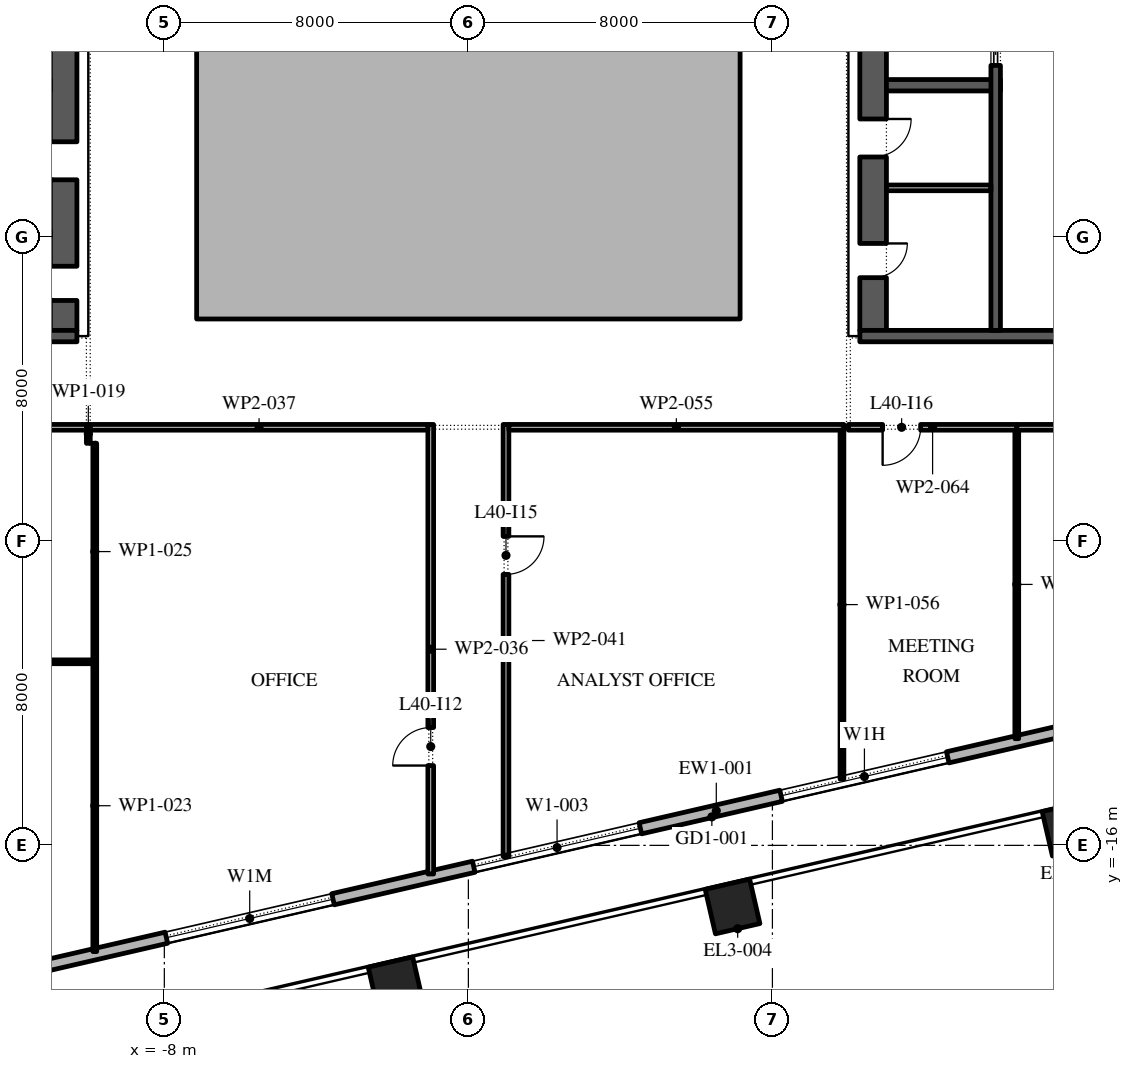
"""IFC4 building model, lengths in metres.
Left out: names, types, materials, properties, quantities, classifications, styles, units other than length and angle.
Written with IfcOpenShell. Run it as: python <this file> out.ifc"""

import sys

from ifc_helpers import new_model, si_unit, direction, frame, frame_2d, origin, origin_2d, place, context, subcontext, project, spatial, polyline, rectangle, outline, extrude, element, fill, save


model = new_model("IFC4")
c1 = context("Model", 3, precision=1e-05, world=origin(), true_north=direction((0.0, 1.0)))
c2 = subcontext(c1, "Body", "Model", "MODEL_VIEW")
j1 = project(units=[si_unit("LENGTHUNIT", "METRE"), si_unit("PLANEANGLEUNIT", "RADIAN")], contexts=[c1])
p1 = place(None, origin())
s1 = spatial("IfcSite", under=j1, at=p1, CompositionType="ELEMENT")
p2 = place(p1, origin())
s2 = spatial("IfcBuilding", under=s1, at=p2, CompositionType="ELEMENT")
p3 = place(p2, frame((0.0, 0.0, 184.2)))
s3 = spatial("IfcBuildingStorey", under=s2, at=p3, CompositionType="ELEMENT", Elevation=184.2)
for number, where, z_axis, x_axis in (
    (1, (-1.916, -19.655, 0.0), (0.0, 0.0, 1.0), (0.974, 0.225, 0.0)),
    (2, (6.951, -17.608, 0.0), (0.0, 0.0, 1.0), (0.974, 0.225, 0.0)),
    (3, (15.818, -15.561, 0.0), (0.0, 0.0, 1.0), (0.974, 0.225, 0.0)),
):
    element("IfcColumn", number, at=place(p3, frame(where, z_axis=z_axis, x_axis=x_axis)), inside=s3, PredefinedType="COLUMN", context=c2, shape_type="SweptSolid", body=[
        extrude(rectangle(XDim=1.2, YDim=1.2, at=origin_2d()), origin(), (0.0, 0.0, 1.0), 4.2),
    ])
p4 = place(p3, origin())
e4 = element("IfcWall", 4, at=p4, inside=s3, PredefinedType="STANDARD", context=c2, shape_type="SweptSolid", body=[
    extrude(outline(polyline([(-7.15, -2.15), (7.15, -2.15), (7.15, 16.15), (-7.15, 16.15), (-7.15, -2.15)]), holes=[polyline([(-7.0, -2.0), (-7.0, 16.0), (7.0, 16.0), (7.0, -2.0), (-7.0, -2.0)])]), origin(), (0.0, 0.0, 1.0), 4.0),
])
p5 = place(p3, frame((-17.592, -20.657, 0.0), z_axis=(0.0, 0.0, 1.0), x_axis=(0.974370243697, 0.224950279389, 0.0)))
e5 = element("IfcWall", 5, at=p5, inside=s3, PredefinedType="STANDARD", context=c2, shape_type="SweptSolid", body=[
    extrude(rectangle(XDim=49.5, YDim=0.3, at=frame_2d((24.75, 0.0))), origin(), (0.0, 0.0, 1.0), 4.0),
])
p6 = place(p5, frame((2.8, 0.0, 0.0)))
e6 = element("IfcOpeningElement", 6, at=p6, cuts=e5, PredefinedType="OPENING", context=c2, shape_type="SweptSolid", body=[
    extrude(rectangle(XDim=2.4, YDim=3.5, at=frame_2d((1.2, 1.75))), frame((0.0, 0.16, 0.0), z_axis=(0.0, -1.0, 0.0), x_axis=(1.0, 0.0, 0.0)), (0.0, 0.0, 1.0), 0.32),
])
p7 = place(p5, frame((9.9, 0.0, 0.45)))
e7 = element("IfcOpeningElement", 7, at=p7, cuts=e5, PredefinedType="OPENING", context=c2, shape_type="SweptSolid", body=[
    extrude(rectangle(XDim=4.5, YDim=2.575, at=frame_2d((2.25, 1.288))), frame((0.0, 0.16, 0.0), z_axis=(0.0, -1.0, 0.0), x_axis=(1.0, 0.0, 0.0)), (0.0, 0.0, 1.0), 0.32),
])
p8 = place(p5, frame((18.2, 0.0, 0.45)))
e8 = element("IfcOpeningElement", 8, at=p8, cuts=e5, PredefinedType="OPENING", context=c2, shape_type="SweptSolid", body=[
    extrude(rectangle(XDim=4.5, YDim=3.05, at=frame_2d((2.25, 1.525))), frame((0.0, 0.16, 0.0), z_axis=(0.0, -1.0, 0.0), x_axis=(1.0, 0.0, 0.0)), (0.0, 0.0, 1.0), 0.32),
])
p9 = place(p5, frame((26.5, 0.0, 0.45)))
e9 = element("IfcOpeningElement", 9, at=p9, cuts=e5, PredefinedType="OPENING", context=c2, shape_type="SweptSolid", body=[
    extrude(rectangle(XDim=4.5, YDim=2.75, at=frame_2d((2.25, 1.375))), frame((0.0, 0.16, 0.0), z_axis=(0.0, -1.0, 0.0), x_axis=(1.0, 0.0, 0.0)), (0.0, 0.0, 1.0), 0.32),
])
p10 = place(p5, frame((35.85, 0.0, 0.0)))
e10 = element("IfcOpeningElement", 10, at=p10, cuts=e5, PredefinedType="OPENING", context=c2, shape_type="SweptSolid", body=[
    extrude(rectangle(XDim=2.4, YDim=3.5, at=frame_2d((1.2, 1.75))), frame((0.0, 0.16, 0.0), z_axis=(0.0, -1.0, 0.0), x_axis=(1.0, 0.0, 0.0)), (0.0, 0.0, 1.0), 0.32),
])
p11 = place(p5, frame((43.1, 0.0, 0.45)))
e11 = element("IfcOpeningElement", 11, at=p11, cuts=e5, PredefinedType="OPENING", context=c2, shape_type="SweptSolid", body=[
    extrude(rectangle(XDim=4.5, YDim=2.875, at=frame_2d((2.25, 1.438))), frame((0.0, 0.16, 0.0), z_axis=(0.0, -1.0, 0.0), x_axis=(1.0, 0.0, 0.0)), (0.0, 0.0, 1.0), 0.32),
])
p12 = place(p3, frame((-10.65, -2.45, 0.0), z_axis=(0.0, 0.0, 1.0), x_axis=(0.0, 1.0, 0.0)))
e12 = element("IfcWall", 12, at=p12, inside=s3, PredefinedType="SHEAR", context=c2, shape_type="SweptSolid", body=[
    extrude(rectangle(XDim=27.9, YDim=0.7, at=frame_2d((13.95, 0.0))), origin(), (0.0, 0.0, 1.0), 4.0),
])
p13 = place(p12, frame((23.65, 0.0, 0.0)))
e13 = element("IfcOpeningElement", 13, at=p13, cuts=e12, PredefinedType="OPENING", context=c2, shape_type="SweptSolid", body=[
    extrude(rectangle(XDim=2.4, YDim=2.1, at=frame_2d((1.2, 1.05))), frame((0.0, 0.36, 0.0), z_axis=(0.0, -1.0, 0.0), x_axis=(1.0, 0.0, 0.0)), (0.0, 0.0, 1.0), 0.72),
])
p14 = place(p12, frame((0.788, 0.0, 0.0)))
e14 = element("IfcOpeningElement", 14, at=p14, cuts=e12, PredefinedType="OPENING", context=c2, shape_type="SweptSolid", body=[
    extrude(rectangle(XDim=0.9, YDim=2.1, at=frame_2d((0.45, 1.05))), frame((0.0, 0.36, 0.0), z_axis=(0.0, -1.0, 0.0), x_axis=(1.0, 0.0, 0.0)), (0.0, 0.0, 1.0), 0.72),
])
p15 = place(p12, frame((3.962, 0.0, 0.0)))
e15 = element("IfcOpeningElement", 15, at=p15, cuts=e12, PredefinedType="OPENING", context=c2, shape_type="SweptSolid", body=[
    extrude(rectangle(XDim=1.0, YDim=2.1, at=frame_2d((0.5, 1.05))), frame((0.0, 0.36, 0.0), z_axis=(0.0, -1.0, 0.0), x_axis=(1.0, 0.0, 0.0)), (0.0, 0.0, 1.0), 0.72),
])
p16 = place(p3, frame((-21.7, -2.6, 0.0), z_axis=(0.0, 0.0, 1.0), x_axis=(1.0, 0.0, 0.0)))
e16 = element("IfcWall", 16, at=p16, inside=s3, PredefinedType="SHEAR", context=c2, shape_type="SweptSolid", body=[
    extrude(rectangle(XDim=11.4, YDim=0.3, at=frame_2d((5.7, 0.0))), origin(), (0.0, 0.0, 1.0), 4.0),
])
p17 = place(p3, frame((10.65, -2.45, 0.0), z_axis=(0.0, 0.0, 1.0), x_axis=(0.0, 1.0, 0.0)))
e17 = element("IfcWall", 17, at=p17, inside=s3, PredefinedType="SHEAR", context=c2, shape_type="SweptSolid", body=[
    extrude(rectangle(XDim=27.9, YDim=0.7, at=frame_2d((13.95, 0.0))), origin(), (0.0, 0.0, 1.0), 4.0),
])
p18 = place(p17, frame((23.65, 0.0, 0.0)))
e18 = element("IfcOpeningElement", 18, at=p18, cuts=e17, PredefinedType="OPENING", context=c2, shape_type="SweptSolid", body=[
    extrude(rectangle(XDim=2.4, YDim=2.1, at=frame_2d((1.2, 1.05))), frame((0.0, 0.36, 0.0), z_axis=(0.0, -1.0, 0.0), x_axis=(1.0, 0.0, 0.0)), (0.0, 0.0, 1.0), 0.72),
])
p19 = place(p17, frame((1.387, 0.0, 0.0)))
e19 = element("IfcOpeningElement", 19, at=p19, cuts=e17, PredefinedType="OPENING", context=c2, shape_type="SweptSolid", body=[
    extrude(rectangle(XDim=0.9, YDim=2.1, at=frame_2d((0.45, 1.05))), frame((0.0, 0.36, 0.0), z_axis=(0.0, -1.0, 0.0), x_axis=(1.0, 0.0, 0.0)), (0.0, 0.0, 1.0), 0.72),
])
p20 = place(p17, frame((4.562, 0.0, 0.0)))
e20 = element("IfcOpeningElement", 20, at=p20, cuts=e17, PredefinedType="OPENING", context=c2, shape_type="SweptSolid", body=[
    extrude(rectangle(XDim=1.0, YDim=2.1, at=frame_2d((0.5, 1.05))), frame((0.0, 0.36, 0.0), z_axis=(0.0, -1.0, 0.0), x_axis=(1.0, 0.0, 0.0)), (0.0, 0.0, 1.0), 0.72),
])
p21 = place(p3, frame((10.3, -2.6, 0.0), z_axis=(0.0, 0.0, 1.0), x_axis=(1.0, 0.0, 0.0)))
e21 = element("IfcWall", 21, at=p21, inside=s3, PredefinedType="SHEAR", context=c2, shape_type="SweptSolid", body=[
    extrude(rectangle(XDim=11.4, YDim=0.3, at=frame_2d((5.7, 0.0))), origin(), (0.0, 0.0, 1.0), 4.0),
])
p22 = place(p3, frame((11.0, 4.0, 0.0), z_axis=(0.0, 0.0, 1.0), x_axis=(1.0, 0.0, 0.0)))
e22 = element("IfcWall", 22, at=p22, inside=s3, PredefinedType="SHEAR", context=c2, shape_type="SweptSolid", body=[
    extrude(rectangle(XDim=3.0, YDim=0.3, at=frame_2d((1.5, 0.0))), origin(), (0.0, 0.0, 1.0), 4.0),
])
p23 = place(p3, frame((13.875, -2.45, 0.0), z_axis=(0.0, 0.0, 1.0), x_axis=(0.0, 1.0, 0.0)))
e23 = element("IfcWall", 23, at=p23, inside=s3, PredefinedType="SHEAR", context=c2, shape_type="SweptSolid", body=[
    extrude(rectangle(XDim=21.3, YDim=0.25, at=frame_2d((10.65, 0.0))), origin(), (0.0, 0.0, 1.0), 4.0),
])
p24 = place(p23, frame((17.786, 0.0, 0.0)))
e24 = element("IfcOpeningElement", 24, at=p24, cuts=e23, PredefinedType="OPENING", context=c2, shape_type="SweptSolid", body=[
    extrude(rectangle(XDim=0.9, YDim=2.1, at=frame_2d((0.45, 1.05))), frame((0.0, 0.135, 0.0), z_axis=(0.0, -1.0, 0.0), x_axis=(1.0, 0.0, 0.0)), (0.0, 0.0, 1.0), 0.27),
])
p25 = place(p23, frame((6.971, 0.0, 0.0)))
e25 = element("IfcOpeningElement", 25, at=p25, cuts=e23, PredefinedType="OPENING", context=c2, shape_type="SweptSolid", body=[
    extrude(rectangle(XDim=1.1, YDim=2.1, at=frame_2d((0.55, 1.05))), frame((0.0, 0.135, 0.0), z_axis=(0.0, -1.0, 0.0), x_axis=(1.0, 0.0, 0.0)), (0.0, 0.0, 1.0), 0.27),
])
p26 = place(p23, frame((9.114, 0.0, 0.0)))
e26 = element("IfcOpeningElement", 26, at=p26, cuts=e23, PredefinedType="OPENING", context=c2, shape_type="SweptSolid", body=[
    extrude(rectangle(XDim=1.1, YDim=2.1, at=frame_2d((0.55, 1.05))), frame((0.0, 0.135, 0.0), z_axis=(0.0, -1.0, 0.0), x_axis=(1.0, 0.0, 0.0)), (0.0, 0.0, 1.0), 0.27),
])
p27 = place(p23, frame((11.257, 0.0, 0.0)))
e27 = element("IfcOpeningElement", 27, at=p27, cuts=e23, PredefinedType="OPENING", context=c2, shape_type="SweptSolid", body=[
    extrude(rectangle(XDim=1.1, YDim=2.1, at=frame_2d((0.55, 1.05))), frame((0.0, 0.135, 0.0), z_axis=(0.0, -1.0, 0.0), x_axis=(1.0, 0.0, 0.0)), (0.0, 0.0, 1.0), 0.27),
])
p28 = place(p23, frame((13.4, 0.0, 0.0)))
e28 = element("IfcOpeningElement", 28, at=p28, cuts=e23, PredefinedType="OPENING", context=c2, shape_type="SweptSolid", body=[
    extrude(rectangle(XDim=1.1, YDim=2.1, at=frame_2d((0.55, 1.05))), frame((0.0, 0.135, 0.0), z_axis=(0.0, -1.0, 0.0), x_axis=(1.0, 0.0, 0.0)), (0.0, 0.0, 1.0), 0.27),
])
p29 = place(p3, frame((11.0, 1.3, 0.0), z_axis=(0.0, 0.0, 1.0), x_axis=(1.0, 0.0, 0.0)))
e29 = element("IfcWall", 29, at=p29, inside=s3, PredefinedType="PARTITIONING", context=c2, shape_type="SweptSolid", body=[
    extrude(rectangle(XDim=2.75, YDim=0.15, at=frame_2d((1.375, 0.0))), origin(), (0.0, 0.0, 1.0), 4.0),
])
p30 = place(p3, frame((-10.0, -5.42, 0.0), z_axis=(0.0, 0.0, 1.0), x_axis=(0.0, 1.0, 0.0)))
e30 = element("IfcWall", 30, at=p30, inside=s3, PredefinedType="PARTITIONING", context=c2, shape_type="SweptSolid", body=[
    extrude(rectangle(XDim=0.495, YDim=0.1, at=frame_2d((0.248, 0.0))), origin(), (0.0, 0.0, 1.0), 4.0),
])
p31 = place(p3, frame((-10.05, -5.0, 0.0), z_axis=(0.0, 0.0, 1.0), x_axis=(-1.0, 0.0, 0.0)))
e31 = element("IfcWall", 31, at=p31, inside=s3, PredefinedType="PARTITIONING", context=c2, shape_type="SweptSolid", body=[
    extrude(rectangle(XDim=13.665, YDim=0.15, at=frame_2d((6.833, 0.0))), origin(), (0.0, 0.0, 1.0), 4.0),
])
p32 = place(p31, frame((5.09, 0.0, 0.0)))
e32 = element("IfcOpeningElement", 32, at=p32, cuts=e31, PredefinedType="OPENING", context=c2, shape_type="SweptSolid", body=[
    extrude(rectangle(XDim=1.0, YDim=2.1, at=frame_2d((0.5, 1.05))), frame((0.0, 0.085, 0.0), z_axis=(0.0, -1.0, 0.0), x_axis=(1.0, 0.0, 0.0)), (0.0, 0.0, 1.0), 0.17),
])
p33 = place(p3, frame((-9.83, -18.794, 0.0), z_axis=(0.0, 0.0, 1.0), x_axis=(0.0, 1.0, 0.0)))
e33 = element("IfcWall", 33, at=p33, inside=s3, PredefinedType="PARTITIONING", context=c2, shape_type="SweptSolid", body=[
    extrude(rectangle(XDim=7.674, YDim=0.1, at=frame_2d((3.837, 0.0))), origin(), (0.0, 0.0, 1.0), 4.0),
])
p34 = place(p3, frame((-9.88, -11.17, 0.0), z_axis=(0.0, 0.0, 1.0), x_axis=(-1.0, 0.0, 0.0)))
e34 = element("IfcWall", 34, at=p34, inside=s3, PredefinedType="PARTITIONING", context=c2, shape_type="SweptSolid", body=[
    extrude(rectangle(XDim=13.68, YDim=0.1, at=frame_2d((6.84, 0.0))), origin(), (0.0, 0.0, 1.0), 4.0),
])
p35 = place(p34, frame((3.81, 0.0, 0.0)))
e35 = element("IfcOpeningElement", 35, at=p35, cuts=e34, PredefinedType="OPENING", context=c2, shape_type="SweptSolid", body=[
    extrude(rectangle(XDim=0.9, YDim=2.1, at=frame_2d((0.45, 1.05))), frame((0.0, 0.06, 0.0), z_axis=(0.0, -1.0, 0.0), x_axis=(1.0, 0.0, 0.0)), (0.0, 0.0, 1.0), 0.12),
])
p36 = place(p3, frame((-9.83, -11.12, 0.0), z_axis=(0.0, 0.0, 1.0), x_axis=(0.0, 1.0, 0.0)))
e36 = element("IfcWall", 36, at=p36, inside=s3, PredefinedType="PARTITIONING", context=c2, shape_type="SweptSolid", body=[
    extrude(rectangle(XDim=5.7, YDim=0.1, at=frame_2d((2.85, 0.0))), origin(), (0.0, 0.0, 1.0), 4.0),
])
p37 = place(p3, frame((-0.99, -16.753, 0.0), z_axis=(0.0, 0.0, 1.0), x_axis=(0.0, 1.0, 0.0)))
e37 = element("IfcWall", 37, at=p37, inside=s3, PredefinedType="PARTITIONING", context=c2, shape_type="SweptSolid", body=[
    extrude(rectangle(XDim=11.828, YDim=0.15, at=frame_2d((5.914, 0.0))), origin(), (0.0, 0.0, 1.0), 4.0),
])
p38 = place(p37, frame((2.853, 0.0, 0.0)))
e38 = element("IfcOpeningElement", 38, at=p38, cuts=e37, PredefinedType="OPENING", context=c2, shape_type="SweptSolid", body=[
    extrude(rectangle(XDim=1.0, YDim=2.1, at=frame_2d((0.5, 1.05))), frame((0.0, 0.085, 0.0), z_axis=(0.0, -1.0, 0.0), x_axis=(1.0, 0.0, 0.0)), (0.0, 0.0, 1.0), 0.17),
])
p39 = place(p3, frame((-1.065, -5.0, 0.0), z_axis=(0.0, 0.0, 1.0), x_axis=(-1.0, 0.0, 0.0)))
e39 = element("IfcWall", 39, at=p39, inside=s3, PredefinedType="PARTITIONING", context=c2, shape_type="SweptSolid", body=[
    extrude(rectangle(XDim=8.885, YDim=0.15, at=frame_2d((4.442, 0.0))), origin(), (0.0, 0.0, 1.0), 4.0),
])
p40 = place(p3, frame((0.99, -4.925, 0.0), z_axis=(0.0, 0.0, 1.0), x_axis=(0.0, -1.0, 0.0)))
e40 = element("IfcWall", 40, at=p40, inside=s3, PredefinedType="PARTITIONING", context=c2, shape_type="SweptSolid", body=[
    extrude(rectangle(XDim=11.371, YDim=0.15, at=frame_2d((5.686, 0.0))), origin(), (0.0, 0.0, 1.0), 4.0),
])
p41 = place(p40, frame((2.945, 0.0, 0.0)))
e41 = element("IfcOpeningElement", 41, at=p41, cuts=e40, PredefinedType="OPENING", context=c2, shape_type="SweptSolid", body=[
    extrude(rectangle(XDim=1.0, YDim=2.1, at=frame_2d((0.5, 1.05))), frame((0.0, 0.085, 0.0), z_axis=(0.0, -1.0, 0.0), x_axis=(1.0, 0.0, 0.0)), (0.0, 0.0, 1.0), 0.17),
])
p42 = place(p3, frame((9.88, -5.0, 0.0), z_axis=(0.0, 0.0, 1.0), x_axis=(-1.0, 0.0, 0.0)))
e42 = element("IfcWall", 42, at=p42, inside=s3, PredefinedType="PARTITIONING", context=c2, shape_type="SweptSolid", body=[
    extrude(rectangle(XDim=8.815, YDim=0.15, at=frame_2d((4.407, 0.0))), origin(), (0.0, 0.0, 1.0), 4.0),
])
p43 = place(p3, frame((9.83, -5.075, 0.0), z_axis=(0.0, 0.0, 1.0), x_axis=(0.0, -1.0, 0.0)))
e43 = element("IfcWall", 43, at=p43, inside=s3, PredefinedType="PARTITIONING", context=c2, shape_type="SweptSolid", body=[
    extrude(rectangle(XDim=9.18, YDim=0.1, at=frame_2d((4.59, 0.0))), origin(), (0.0, 0.0, 1.0), 4.0),
])
p44 = place(p3, frame((14.43, -5.0, 0.0), z_axis=(0.0, 0.0, 1.0), x_axis=(-1.0, 0.0, 0.0)))
e44 = element("IfcWall", 44, at=p44, inside=s3, PredefinedType="PARTITIONING", context=c2, shape_type="SweptSolid", body=[
    extrude(rectangle(XDim=4.43, YDim=0.15, at=frame_2d((2.215, 0.0))), origin(), (0.0, 0.0, 1.0), 4.0),
])
p45 = place(p44, frame((2.53, 0.0, 0.0)))
e45 = element("IfcOpeningElement", 45, at=p45, cuts=e44, PredefinedType="OPENING", context=c2, shape_type="SweptSolid", body=[
    extrude(rectangle(XDim=1.0, YDim=2.1, at=frame_2d((0.5, 1.05))), frame((0.0, 0.085, 0.0), z_axis=(0.0, -1.0, 0.0), x_axis=(1.0, 0.0, 0.0)), (0.0, 0.0, 1.0), 0.17),
])
p46 = place(p3, frame((14.43, -5.075, 0.0), z_axis=(0.0, 0.0, 1.0), x_axis=(0.0, -1.0, 0.0)))
e46 = element("IfcWall", 46, at=p46, inside=s3, PredefinedType="PARTITIONING", context=c2, shape_type="SweptSolid", body=[
    extrude(rectangle(XDim=8.118, YDim=0.1, at=frame_2d((4.059, 0.0))), origin(), (0.0, 0.0, 1.0), 4.0),
])
p47 = place(p3, frame((22.57, -5.0, 0.0), z_axis=(0.0, 0.0, 1.0), x_axis=(-1.0, 0.0, 0.0)))
e47 = element("IfcWall", 47, at=p47, inside=s3, PredefinedType="PARTITIONING", context=c2, shape_type="SweptSolid", body=[
    extrude(rectangle(XDim=8.14, YDim=0.15, at=frame_2d((4.07, 0.0))), origin(), (0.0, 0.0, 1.0), 4.0),
])
p48 = place(p47, frame((3.49, 0.0, 0.0)))
e48 = element("IfcOpeningElement", 48, at=p48, cuts=e47, PredefinedType="OPENING", context=c2, shape_type="SweptSolid", body=[
    extrude(rectangle(XDim=1.0, YDim=2.1, at=frame_2d((0.5, 1.05))), frame((0.0, 0.085, 0.0), z_axis=(0.0, -1.0, 0.0), x_axis=(1.0, 0.0, 0.0)), (0.0, 0.0, 1.0), 0.17),
])
p49 = place(p7, origin())
e49 = element("IfcWindow", 49, at=p49, inside=s3, PartitioningType="DOUBLE_PANEL_VERTICAL", PredefinedType="WINDOW", context=c2, shape_type="SweptSolid", body=[
    extrude(rectangle(XDim=4.5, YDim=2.575, at=frame_2d((2.25, 1.288))), frame((0.0, 0.03, 0.0), z_axis=(0.0, -1.0, 0.0), x_axis=(1.0, 0.0, 0.0)), (0.0, 0.0, 1.0), 0.06),
])
fill(e7, e49)
p50 = place(p8, origin())
e50 = element("IfcWindow", 50, at=p50, inside=s3, PartitioningType="DOUBLE_PANEL_VERTICAL", PredefinedType="WINDOW", context=c2, shape_type="SweptSolid", body=[
    extrude(rectangle(XDim=4.5, YDim=3.05, at=frame_2d((2.25, 1.525))), frame((0.0, 0.03, 0.0), z_axis=(0.0, -1.0, 0.0), x_axis=(1.0, 0.0, 0.0)), (0.0, 0.0, 1.0), 0.06),
])
fill(e8, e50)
p51 = place(p9, origin())
e51 = element("IfcWindow", 51, at=p51, inside=s3, PartitioningType="DOUBLE_PANEL_VERTICAL", PredefinedType="WINDOW", context=c2, shape_type="SweptSolid", body=[
    extrude(rectangle(XDim=4.5, YDim=2.75, at=frame_2d((2.25, 1.375))), frame((0.0, 0.03, 0.0), z_axis=(0.0, -1.0, 0.0), x_axis=(1.0, 0.0, 0.0)), (0.0, 0.0, 1.0), 0.06),
])
fill(e9, e51)
p52 = place(p25, origin())
e52 = element("IfcDoor", 52, at=p52, inside=s3, OperationType="SLIDING_TO_LEFT", PredefinedType="DOOR", context=c2, shape_type="SweptSolid", body=[
    extrude(rectangle(XDim=1.1, YDim=2.1, at=frame_2d((0.55, 1.05))), frame((0.0, 0.025, 0.0), z_axis=(0.0, -1.0, 0.0), x_axis=(1.0, 0.0, 0.0)), (0.0, 0.0, 1.0), 0.05),
])
fill(e25, e52)
p53 = place(p19, frame((0.9, -0.65, 0.0), z_axis=(0.0, 0.0, 1.0), x_axis=(-1.0, 0.0, 0.0)))
e53 = element("IfcDoor", 53, at=p53, inside=s3, OperationType="SINGLE_SWING_RIGHT", PredefinedType="DOOR", context=c2, shape_type="SweptSolid", body=[
    extrude(rectangle(XDim=0.9, YDim=2.1, at=frame_2d((0.45, 1.05))), frame((0.0, -0.3, 0.0), z_axis=(0.0, -1.0, 0.0), x_axis=(1.0, 0.0, 0.0)), (0.0, 0.0, 1.0), 0.05),
])
fill(e19, e53)
p54 = place(p20, frame((1.0, -0.65, 0.0), z_axis=(0.0, 0.0, 1.0), x_axis=(-1.0, 0.0, 0.0)))
e54 = element("IfcDoor", 54, at=p54, inside=s3, OperationType="SINGLE_SWING_RIGHT", PredefinedType="DOOR", context=c2, shape_type="SweptSolid", body=[
    extrude(rectangle(XDim=1.0, YDim=2.1, at=frame_2d((0.5, 1.05))), frame((0.0, -0.3, 0.0), z_axis=(0.0, -1.0, 0.0), x_axis=(1.0, 0.0, 0.0)), (0.0, 0.0, 1.0), 0.05),
])
fill(e20, e54)
p55 = place(p38, origin())
e55 = element("IfcDoor", 55, at=p55, inside=s3, OperationType="SINGLE_SWING_RIGHT", PredefinedType="DOOR", context=c2, shape_type="SweptSolid", body=[
    extrude(rectangle(XDim=1.0, YDim=2.1, at=frame_2d((0.5, 1.05))), frame((0.0, 0.025, 0.0), z_axis=(0.0, -1.0, 0.0), x_axis=(1.0, 0.0, 0.0)), (0.0, 0.0, 1.0), 0.05),
])
fill(e38, e55)
p56 = place(p41, origin())
e56 = element("IfcDoor", 56, at=p56, inside=s3, OperationType="SINGLE_SWING_RIGHT", PredefinedType="DOOR", context=c2, shape_type="SweptSolid", body=[
    extrude(rectangle(XDim=1.0, YDim=2.1, at=frame_2d((0.5, 1.05))), frame((0.0, 0.025, 0.0), z_axis=(0.0, -1.0, 0.0), x_axis=(1.0, 0.0, 0.0)), (0.0, 0.0, 1.0), 0.05),
])
fill(e41, e56)
p57 = place(p45, origin())
e57 = element("IfcDoor", 57, at=p57, inside=s3, OperationType="SINGLE_SWING_LEFT", PredefinedType="DOOR", context=c2, shape_type="SweptSolid", body=[
    extrude(rectangle(XDim=1.0, YDim=2.1, at=frame_2d((0.5, 1.05))), frame((0.0, 0.025, 0.0), z_axis=(0.0, -1.0, 0.0), x_axis=(1.0, 0.0, 0.0)), (0.0, 0.0, 1.0), 0.05),
])
fill(e45, e57)
save(model, sys.argv[1])
